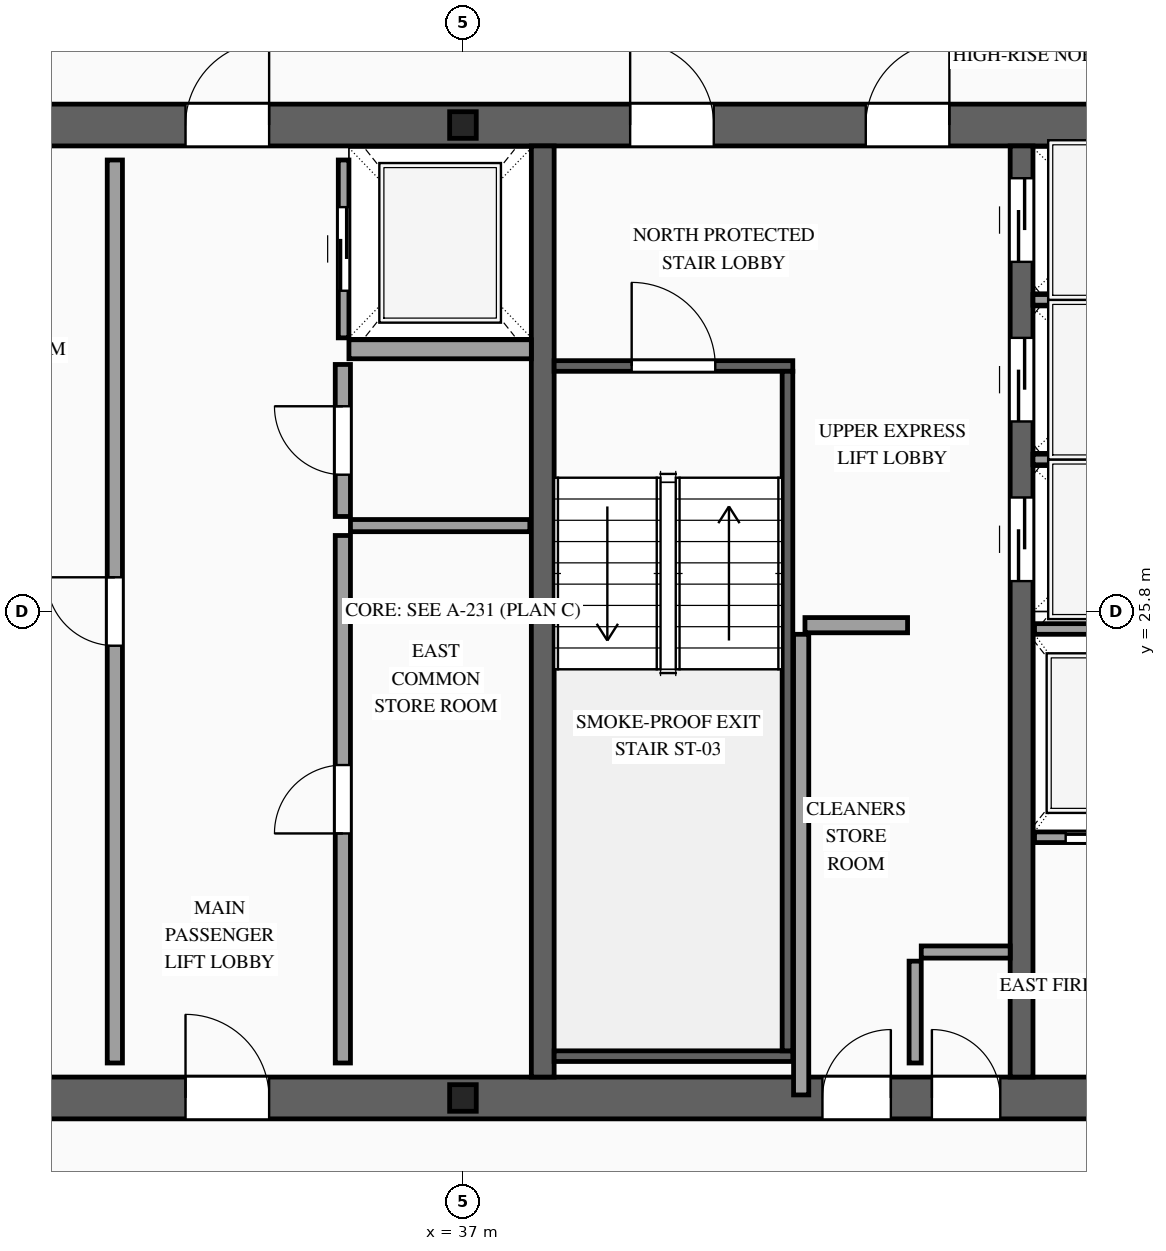
"""IFC4 building model, lengths in metres.
Left out: names, types, materials, properties, quantities, classifications, styles, units other than length and angle.
Written with IfcOpenShell. Run it as: python <this file> out.ifc"""

import sys

from ifc_helpers import new_model, si_unit, direction, frame, frame_2d, origin, origin_2d, place, context, subcontext, project, spatial, rectangle, i_section, extrude, source, transform, mapped, element, fill, save


model = new_model("IFC4")
c1 = context("Model", 3, precision=1e-05, world=origin(), true_north=direction((0.0, 1.0)))
c2 = subcontext(c1, "Body", "Model", "MODEL_VIEW")
j1 = project(units=[si_unit("LENGTHUNIT", "METRE"), si_unit("PLANEANGLEUNIT", "RADIAN")], contexts=[c1])
p1 = place(None, origin())
s1 = spatial("IfcSite", under=j1, at=p1, CompositionType="ELEMENT")
p2 = place(p1, origin())
s2 = spatial("IfcBuilding", under=s1, at=p2, CompositionType="ELEMENT")
p3 = place(p2, frame((0.0, 0.0, 278.6)))
s3 = spatial("IfcBuildingStorey", under=s2, at=p3, CompositionType="ELEMENT", Elevation=278.6)
p4 = place(p3, frame((23.525, 19.4, 0.0), z_axis=(0.0, 0.0, 1.0), x_axis=(1.0, 0.0, 0.0)))
e1 = element("IfcWall", 1, at=p4, inside=s3, PredefinedType="SHEAR", context=c2, shape_type="SweptSolid", body=[
    extrude(rectangle(XDim=26.95, YDim=0.55, at=frame_2d((13.475, 0.0))), origin(), (0.0, 0.0, 1.0), 3.5),
])
p5 = place(p4, frame((1.925, 0.0, 0.0)))
e2 = element("IfcOpeningElement", 2, at=p5, cuts=e1, PredefinedType="OPENING", context=c2, shape_type="SweptSolid", body=[
    extrude(rectangle(XDim=1.1, YDim=2.2, at=frame_2d((0.55, 1.1))), frame((0.0, 0.29, 0.0), z_axis=(0.0, -1.0, 0.0), x_axis=(1.0, 0.0, 0.0)), (0.0, 0.0, 1.0), 0.58),
])
p6 = place(p4, frame((9.825, 0.0, 0.0)))
e3 = element("IfcOpeningElement", 3, at=p6, cuts=e1, PredefinedType="OPENING", context=c2, shape_type="SweptSolid", body=[
    extrude(rectangle(XDim=1.1, YDim=2.2, at=frame_2d((0.55, 1.1))), frame((0.0, 0.29, 0.0), z_axis=(0.0, -1.0, 0.0), x_axis=(1.0, 0.0, 0.0)), (0.0, 0.0, 1.0), 0.58),
])
p7 = place(p4, frame((23.025, 0.0, 0.0)))
e4 = element("IfcOpeningElement", 4, at=p7, cuts=e1, PredefinedType="OPENING", context=c2, shape_type="SweptSolid", body=[
    extrude(rectangle(XDim=1.1, YDim=2.2, at=frame_2d((0.55, 1.1))), frame((0.0, 0.29, 0.0), z_axis=(0.0, -1.0, 0.0), x_axis=(1.0, 0.0, 0.0)), (0.0, 0.0, 1.0), 0.58),
])
p8 = place(p4, frame((19.645, 0.0, 0.0)))
e5 = element("IfcOpeningElement", 5, at=p8, cuts=e1, PredefinedType="OPENING", context=c2, shape_type="SweptSolid", body=[
    extrude(rectangle(XDim=0.9, YDim=2.15, at=frame_2d((0.45, 1.075))), frame((0.0, 0.29, 0.0), z_axis=(0.0, -1.0, 0.0), x_axis=(1.0, 0.0, 0.0)), (0.0, 0.0, 1.0), 0.58),
])
p9 = place(p4, frame((18.205, 0.0, 0.0)))
e6 = element("IfcOpeningElement", 6, at=p9, cuts=e1, PredefinedType="OPENING", context=c2, shape_type="SweptSolid", body=[
    extrude(rectangle(XDim=0.9, YDim=2.15, at=frame_2d((0.45, 1.075))), frame((0.0, 0.29, 0.0), z_axis=(0.0, -1.0, 0.0), x_axis=(1.0, 0.0, 0.0)), (0.0, 0.0, 1.0), 0.58),
])
p10 = place(p3, frame((23.525, 32.2, 0.0), z_axis=(0.0, 0.0, 1.0), x_axis=(1.0, 0.0, 0.0)))
e7 = element("IfcWall", 7, at=p10, inside=s3, PredefinedType="SHEAR", context=c2, shape_type="SweptSolid", body=[
    extrude(rectangle(XDim=26.95, YDim=0.55, at=frame_2d((13.475, 0.0))), origin(), (0.0, 0.0, 1.0), 3.5),
])
p11 = place(p10, frame((4.545, 0.0, 0.0)))
e8 = element("IfcOpeningElement", 8, at=p11, cuts=e7, PredefinedType="OPENING", context=c2, shape_type="SweptSolid", body=[
    extrude(rectangle(XDim=0.9, YDim=2.15, at=frame_2d((0.45, 1.075))), frame((0.0, 0.29, 0.0), z_axis=(0.0, -1.0, 0.0), x_axis=(1.0, 0.0, 0.0)), (0.0, 0.0, 1.0), 0.58),
])
p12 = place(p10, frame((9.825, 0.0, 0.0)))
e9 = element("IfcOpeningElement", 9, at=p12, cuts=e7, PredefinedType="OPENING", context=c2, shape_type="SweptSolid", body=[
    extrude(rectangle(XDim=1.1, YDim=2.2, at=frame_2d((0.55, 1.1))), frame((0.0, 0.29, 0.0), z_axis=(0.0, -1.0, 0.0), x_axis=(1.0, 0.0, 0.0)), (0.0, 0.0, 1.0), 0.58),
])
p13 = place(p10, frame((15.675, 0.0, 0.0)))
e10 = element("IfcOpeningElement", 10, at=p13, cuts=e7, PredefinedType="OPENING", context=c2, shape_type="SweptSolid", body=[
    extrude(rectangle(XDim=1.1, YDim=2.2, at=frame_2d((0.55, 1.1))), frame((0.0, 0.29, 0.0), z_axis=(0.0, -1.0, 0.0), x_axis=(1.0, 0.0, 0.0)), (0.0, 0.0, 1.0), 0.58),
])
p14 = place(p10, frame((18.775, 0.0, 0.0)))
e11 = element("IfcOpeningElement", 11, at=p14, cuts=e7, PredefinedType="OPENING", context=c2, shape_type="SweptSolid", body=[
    extrude(rectangle(XDim=1.1, YDim=2.2, at=frame_2d((0.55, 1.1))), frame((0.0, 0.29, 0.0), z_axis=(0.0, -1.0, 0.0), x_axis=(1.0, 0.0, 0.0)), (0.0, 0.0, 1.0), 0.58),
])
m1 = source(origin(), c2, "Body", "SweptSolid", [
    extrude(rectangle(XDim=12.25, YDim=0.3, at=frame_2d((6.125, 0.0))), origin(), (0.0, 0.0, 1.0), 3.5),
])
p15 = place(p3, frame((38.05, 19.675, 0.0), z_axis=(0.0, 0.0, 1.0), x_axis=(0.0, 1.0, 0.0)))
e12 = element("IfcWall", 12, at=p15, inside=s3, PredefinedType="SOLIDWALL", context=c2, shape_type="MappedRepresentation", body=[
    mapped(m1, transform((0.0, 0.0, 0.0), scale=1.0)),
])
p16 = place(p3, frame((44.35, 19.675, 0.0), z_axis=(0.0, 0.0, 1.0), x_axis=(0.0, 1.0, 0.0)))
e13 = element("IfcWall", 13, at=p16, inside=s3, PredefinedType="SOLIDWALL", context=c2, shape_type="SweptSolid", body=[
    extrude(rectangle(XDim=12.25, YDim=0.3, at=frame_2d((6.125, 0.0))), origin(), (0.0, 0.0, 1.0), 3.5),
])
p17 = place(p16, frame((6.525, 0.0, 0.0)))
e14 = element("IfcOpeningElement", 14, at=p17, cuts=e13, PredefinedType="OPENING", context=c2, shape_type="SweptSolid", body=[
    extrude(rectangle(XDim=1.1, YDim=2.2, at=frame_2d((0.55, 1.1))), frame((0.0, 0.165, 0.0), z_axis=(0.0, -1.0, 0.0), x_axis=(1.0, 0.0, 0.0)), (0.0, 0.0, 1.0), 0.33),
])
p18 = place(p16, frame((8.625, 0.0, 0.0)))
e15 = element("IfcOpeningElement", 15, at=p18, cuts=e13, PredefinedType="OPENING", context=c2, shape_type="SweptSolid", body=[
    extrude(rectangle(XDim=1.1, YDim=2.2, at=frame_2d((0.55, 1.1))), frame((0.0, 0.165, 0.0), z_axis=(0.0, -1.0, 0.0), x_axis=(1.0, 0.0, 0.0)), (0.0, 0.0, 1.0), 0.33),
])
p19 = place(p16, frame((10.725, 0.0, 0.0)))
e16 = element("IfcOpeningElement", 16, at=p19, cuts=e13, PredefinedType="OPENING", context=c2, shape_type="SweptSolid", body=[
    extrude(rectangle(XDim=1.1, YDim=2.2, at=frame_2d((0.55, 1.1))), frame((0.0, 0.165, 0.0), z_axis=(0.0, -1.0, 0.0), x_axis=(1.0, 0.0, 0.0)), (0.0, 0.0, 1.0), 0.33),
])
m2 = source(origin(), c2, "Body", "SweptSolid", [
    extrude(i_section(OverallWidth=0.35, OverallDepth=0.35, WebThickness=0.012, FlangeThickness=0.019, at=origin_2d()), origin(), (0.0, 0.0, 1.0), 3.5),
])
for number, where, z_axis, x_axis in (
    (17, (37.0, 19.4, 0.0), (0.0, 0.0, 1.0), (1.0, 0.0, 0.0)),
    (18, (37.0, 32.2, 0.0), (0.0, 0.0, 1.0), (1.0, 0.0, 0.0)),
):
    element("IfcColumn", number, at=place(p3, frame(where, z_axis=z_axis, x_axis=x_axis)), inside=s3, PredefinedType="COLUMN", context=c2, shape_type="MappedRepresentation", body=[
        mapped(m2, transform((0.0, 0.0, 0.0), scale=1.0)),
    ])
p20 = place(p3, frame((44.52, 22.83, 0.0), z_axis=(0.0, 0.0, 1.0), x_axis=(1.0, 0.0, 0.0)))
e19 = element("IfcWall", 19, at=p20, inside=s3, PredefinedType="SOLIDWALL", context=c2, shape_type="SweptSolid", body=[
    extrude(rectangle(XDim=1.92, YDim=0.14, at=frame_2d((0.96, 0.0))), origin(), (0.0, 0.0, 1.0), 3.28),
])
p21 = place(p20, frame((0.41, 0.0, 0.0)))
e20 = element("IfcOpeningElement", 20, at=p21, cuts=e19, PredefinedType="OPENING", context=c2, shape_type="SweptSolid", body=[
    extrude(rectangle(XDim=1.1, YDim=2.2, at=frame_2d((0.55, 1.1))), frame((0.0, 0.085, 0.0), z_axis=(0.0, -1.0, 0.0), x_axis=(1.0, 0.0, 0.0)), (0.0, 0.0, 1.0), 0.17),
])
m3 = source(origin(), c2, "Body", "SweptSolid", [
    extrude(rectangle(XDim=1.92, YDim=0.14, at=frame_2d((0.96, 0.0))), origin(), (0.0, 0.0, 1.0), 3.28),
])
p22 = place(p3, frame((44.52, 25.57, 0.0), z_axis=(0.0, 0.0, 1.0), x_axis=(1.0, 0.0, 0.0)))
e21 = element("IfcWall", 21, at=p22, inside=s3, PredefinedType="SOLIDWALL", context=c2, shape_type="MappedRepresentation", body=[
    mapped(m3, transform((0.0, 0.0, 0.0), scale=1.0)),
])
p23 = place(p3, frame((35.43, 29.4, 0.0), z_axis=(0.0, 0.0, 1.0), x_axis=(0.0, 1.0, 0.0)))
e22 = element("IfcWall", 22, at=p23, inside=s3, PredefinedType="SOLIDWALL", context=c2, shape_type="SweptSolid", body=[
    extrude(rectangle(XDim=2.34, YDim=0.14, at=frame_2d((1.17, 0.0))), origin(), (0.0, 0.0, 1.0), 3.28),
])
p24 = place(p23, frame((0.62, 0.0, 0.0)))
e23 = element("IfcOpeningElement", 23, at=p24, cuts=e22, PredefinedType="OPENING", context=c2, shape_type="SweptSolid", body=[
    extrude(rectangle(XDim=1.1, YDim=2.2, at=frame_2d((0.55, 1.1))), frame((0.0, 0.085, 0.0), z_axis=(0.0, -1.0, 0.0), x_axis=(1.0, 0.0, 0.0)), (0.0, 0.0, 1.0), 0.17),
])
m4 = source(origin(), c2, "Body", "SweptSolid", [
    extrude(rectangle(XDim=2.4, YDim=0.25, at=frame_2d((1.2, 0.0))), origin(), (0.0, 0.0, 1.0), 3.28),
])
p25 = place(p3, frame((35.5, 29.25, 0.0), z_axis=(0.0, 0.0, 1.0), x_axis=(1.0, 0.0, 0.0)))
e24 = element("IfcWall", 24, at=p25, inside=s3, PredefinedType="SOLIDWALL", context=c2, shape_type="MappedRepresentation", body=[
    mapped(m4, transform((0.0, 0.0, 0.0), scale=1.0)),
])
m5 = source(origin(), c2, "Body", "SweptSolid", [
    extrude(rectangle(XDim=2.0, YDim=0.14, at=frame_2d((1.0, 0.0))), origin(), (0.0, 0.0, 1.0), 3.28),
])
for number, where, z_axis, x_axis in (
    (25, (44.5, 27.8, 0.0), (0.0, 0.0, 1.0), (1.0, 0.0, 0.0)),
    (26, (44.5, 29.9, 0.0), (0.0, 0.0, 1.0), (1.0, 0.0, 0.0)),
):
    element("IfcWall", number, at=place(p3, frame(where, z_axis=z_axis, x_axis=x_axis)), inside=s3, PredefinedType="SOLIDWALL", context=c2, shape_type="MappedRepresentation", body=[
        mapped(m5, transform((0.0, 0.0, 0.0), scale=1.0)),
    ])
p26 = place(p3, frame((38.2, 29.03, 0.0), z_axis=(0.0, 0.0, 1.0), x_axis=(1.0, 0.0, 0.0)))
e27 = element("IfcWall", 27, at=p26, inside=s3, PredefinedType="SOLIDWALL", context=c2, shape_type="SweptSolid", body=[
    extrude(rectangle(XDim=3.14, YDim=0.14, at=frame_2d((1.57, 0.0))), origin(), (0.0, 0.0, 1.0), 3.28),
])
p27 = place(p26, frame((1.02, 0.0, 0.0)))
e28 = element("IfcOpeningElement", 28, at=p27, cuts=e27, PredefinedType="OPENING", context=c2, shape_type="SweptSolid", body=[
    extrude(rectangle(XDim=1.1, YDim=2.2, at=frame_2d((0.55, 1.1))), frame((0.0, 0.085, 0.0), z_axis=(0.0, -1.0, 0.0), x_axis=(1.0, 0.0, 0.0)), (0.0, 0.0, 1.0), 0.17),
])
m6 = source(origin(), c2, "Body", "SweptSolid", [
    extrude(rectangle(XDim=3.14, YDim=0.14, at=frame_2d((1.57, 0.0))), origin(), (0.0, 0.0, 1.0), 3.28),
])
p28 = place(p3, frame((38.2, 19.95, 0.0), z_axis=(0.0, 0.0, 1.0), x_axis=(1.0, 0.0, 0.0)))
e29 = element("IfcWall", 29, at=p28, inside=s3, PredefinedType="SOLIDWALL", context=c2, shape_type="MappedRepresentation", body=[
    mapped(m6, transform((0.0, 0.0, 0.0), scale=1.0)),
])
m7 = source(origin(), c2, "Body", "SweptSolid", [
    extrude(rectangle(XDim=8.94, YDim=0.14, at=frame_2d((4.47, 0.0))), origin(), (0.0, 0.0, 1.0), 3.28),
])
p29 = place(p3, frame((41.27, 20.02, 0.0), z_axis=(0.0, 0.0, 1.0), x_axis=(0.0, 1.0, 0.0)))
e30 = element("IfcWall", 30, at=p29, inside=s3, PredefinedType="SOLIDWALL", context=c2, shape_type="MappedRepresentation", body=[
    mapped(m7, transform((0.0, 0.0, 0.0), scale=1.0)),
])
p30 = place(p3, frame((32.42, 19.86, 0.0), z_axis=(0.0, 0.0, 1.0), x_axis=(0.0, 1.0, 0.0)))
e31 = element("IfcWall", 31, at=p30, inside=s3, PredefinedType="PARTITIONING", context=c2, shape_type="SweptSolid", body=[
    extrude(rectangle(XDim=11.88, YDim=0.2, at=frame_2d((5.94, 0.0))), origin(), (0.0, 0.0, 1.0), 3.28),
])
p31 = place(p30, frame((5.49, 0.0, 0.0)))
e32 = element("IfcOpeningElement", 32, at=p31, cuts=e31, PredefinedType="OPENING", context=c2, shape_type="SweptSolid", body=[
    extrude(rectangle(XDim=0.9, YDim=2.15, at=frame_2d((0.45, 1.075))), frame((0.0, 0.115, 0.0), z_axis=(0.0, -1.0, 0.0), x_axis=(1.0, 0.0, 0.0)), (0.0, 0.0, 1.0), 0.23),
])
p32 = place(p3, frame((35.42, 19.86, 0.0), z_axis=(0.0, 0.0, 1.0), x_axis=(0.0, 1.0, 0.0)))
e33 = element("IfcWall", 33, at=p32, inside=s3, PredefinedType="PARTITIONING", context=c2, shape_type="SweptSolid", body=[
    extrude(rectangle(XDim=6.94, YDim=0.2, at=frame_2d((3.47, 0.0))), origin(), (0.0, 0.0, 1.0), 3.28),
])
p33 = place(p32, frame((3.02, 0.0, 0.0)))
e34 = element("IfcOpeningElement", 34, at=p33, cuts=e33, PredefinedType="OPENING", context=c2, shape_type="SweptSolid", body=[
    extrude(rectangle(XDim=0.9, YDim=2.15, at=frame_2d((0.45, 1.075))), frame((0.0, 0.115, 0.0), z_axis=(0.0, -1.0, 0.0), x_axis=(1.0, 0.0, 0.0)), (0.0, 0.0, 1.0), 0.23),
])
p34 = place(p3, frame((35.42, 27.05, 0.0), z_axis=(0.0, 0.0, 1.0), x_axis=(0.0, 1.0, 0.0)))
e35 = element("IfcWall", 35, at=p34, inside=s3, PredefinedType="PARTITIONING", context=c2, shape_type="SweptSolid", body=[
    extrude(rectangle(XDim=2.0, YDim=0.2, at=frame_2d((1.0, 0.0))), origin(), (0.0, 0.0, 1.0), 3.28),
])
p35 = place(p34, frame((0.55, 0.0, 0.0)))
e36 = element("IfcOpeningElement", 36, at=p35, cuts=e35, PredefinedType="OPENING", context=c2, shape_type="SweptSolid", body=[
    extrude(rectangle(XDim=0.9, YDim=2.15, at=frame_2d((0.45, 1.075))), frame((0.0, 0.115, 0.0), z_axis=(0.0, -1.0, 0.0), x_axis=(1.0, 0.0, 0.0)), (0.0, 0.0, 1.0), 0.23),
])
m8 = source(origin(), c2, "Body", "SweptSolid", [
    extrude(rectangle(XDim=2.36, YDim=0.16, at=frame_2d((1.18, 0.0))), origin(), (0.0, 0.0, 1.0), 3.28),
])
p36 = place(p3, frame((35.52, 26.93, 0.0), z_axis=(0.0, 0.0, 1.0), x_axis=(1.0, 0.0, 0.0)))
e37 = element("IfcWall", 37, at=p36, inside=s3, PredefinedType="PARTITIONING", context=c2, shape_type="MappedRepresentation", body=[
    mapped(m8, transform((0.0, 0.0, 0.0), scale=1.0)),
])
m9 = source(origin(), c2, "Body", "SweptSolid", [
    extrude(rectangle(XDim=1.34, YDim=0.16, at=frame_2d((0.67, 0.0))), origin(), (0.0, 0.0, 1.0), 3.28),
])
p37 = place(p3, frame((42.95, 19.86, 0.0), z_axis=(0.0, 0.0, 1.0), x_axis=(0.0, 1.0, 0.0)))
e38 = element("IfcWall", 38, at=p37, inside=s3, PredefinedType="PARTITIONING", context=c2, shape_type="MappedRepresentation", body=[
    mapped(m9, transform((0.0, 0.0, 0.0), scale=1.0)),
])
m10 = source(origin(), c2, "Body", "SweptSolid", [
    extrude(rectangle(XDim=1.17, YDim=0.16, at=frame_2d((0.585, 0.0))), origin(), (0.0, 0.0, 1.0), 3.28),
])
p38 = place(p3, frame((43.03, 21.32, 0.0), z_axis=(0.0, 0.0, 1.0), x_axis=(1.0, 0.0, 0.0)))
e39 = element("IfcWall", 39, at=p38, inside=s3, PredefinedType="PARTITIONING", context=c2, shape_type="MappedRepresentation", body=[
    mapped(m10, transform((0.0, 0.0, 0.0), scale=1.0)),
])
m11 = source(origin(), c2, "Body", "SweptSolid", [
    extrude(rectangle(XDim=6.06, YDim=0.2, at=frame_2d((3.03, 0.0))), origin(), (0.0, 0.0, 1.0), 3.28),
])
p39 = place(p3, frame((41.45, 19.44, 0.0), z_axis=(0.0, 0.0, 1.0), x_axis=(0.0, 1.0, 0.0)))
e40 = element("IfcWall", 40, at=p39, inside=s3, PredefinedType="PARTITIONING", context=c2, shape_type="MappedRepresentation", body=[
    mapped(m11, transform((0.0, 0.0, 0.0), scale=1.0)),
])
m12 = source(origin(), c2, "Body", "SweptSolid", [
    extrude(rectangle(XDim=1.35, YDim=0.2, at=frame_2d((0.675, 0.0))), origin(), (0.0, 0.0, 1.0), 3.28),
])
p40 = place(p3, frame((41.5, 25.62, 0.0), z_axis=(0.0, 0.0, 1.0), x_axis=(1.0, 0.0, 0.0)))
e41 = element("IfcWall", 41, at=p40, inside=s3, PredefinedType="PARTITIONING", context=c2, shape_type="MappedRepresentation", body=[
    mapped(m12, transform((0.0, 0.0, 0.0), scale=1.0)),
])
m13 = source(origin(), c2, "Body", "SweptSolid", [
    extrude(rectangle(XDim=1.1, YDim=2.2, at=frame_2d((0.55, 1.1))), frame((0.0, 0.025, 0.0), z_axis=(0.0, -1.0, 0.0), x_axis=(1.0, 0.0, 0.0)), (0.0, 0.0, 1.0), 0.05),
])
p41 = place(p21, origin())
e42 = element("IfcDoor", 42, at=p41, inside=s3, OperationType="SLIDING_TO_RIGHT", PredefinedType="DOOR", context=c2, shape_type="MappedRepresentation", body=[
    mapped(m13, transform((0.0, 0.0, 0.0), scale=1.0)),
])
fill(e20, e42)
p42 = place(p24, origin())
e43 = element("IfcDoor", 43, at=p42, inside=s3, OperationType="SLIDING_TO_RIGHT", PredefinedType="DOOR", context=c2, shape_type="MappedRepresentation", body=[
    mapped(m13, transform((0.0, 0.0, 0.0), scale=1.0)),
])
fill(e23, e43)
p43 = place(p17, origin())
e44 = element("IfcDoor", 44, at=p43, inside=s3, OperationType="SLIDING_TO_LEFT", PredefinedType="DOOR", context=c2, shape_type="MappedRepresentation", body=[
    mapped(m13, transform((0.0, 0.0, 0.0), scale=1.0)),
])
fill(e14, e44)
p44 = place(p18, origin())
e45 = element("IfcDoor", 45, at=p44, inside=s3, OperationType="SLIDING_TO_RIGHT", PredefinedType="DOOR", context=c2, shape_type="MappedRepresentation", body=[
    mapped(m13, transform((0.0, 0.0, 0.0), scale=1.0)),
])
fill(e15, e45)
p45 = place(p19, origin())
e46 = element("IfcDoor", 46, at=p45, inside=s3, OperationType="SLIDING_TO_LEFT", PredefinedType="DOOR", context=c2, shape_type="MappedRepresentation", body=[
    mapped(m13, transform((0.0, 0.0, 0.0), scale=1.0)),
])
fill(e16, e46)
m14 = source(origin(), c2, "Body", "SweptSolid", [
    extrude(rectangle(XDim=1.1, YDim=2.2, at=frame_2d((0.55, 1.1))), frame((0.0, 0.025, 0.0), z_axis=(0.0, -1.0, 0.0), x_axis=(1.0, 0.0, 0.0)), (0.0, 0.0, 1.0), 0.05),
])
p46 = place(p27, origin())
e47 = element("IfcDoor", 47, at=p46, inside=s3, OperationType="SINGLE_SWING_LEFT", PredefinedType="DOOR", context=c2, shape_type="MappedRepresentation", body=[
    mapped(m14, transform((0.0, 0.0, 0.0), scale=1.0)),
])
fill(e28, e47)
p47 = place(p6, origin())
e48 = element("IfcDoor", 48, at=p47, inside=s3, OperationType="SINGLE_SWING_LEFT", PredefinedType="DOOR", context=c2, shape_type="MappedRepresentation", body=[
    mapped(m14, transform((0.0, 0.0, 0.0), scale=1.0)),
])
fill(e3, e48)
p48 = place(p12, origin())
e49 = element("IfcDoor", 49, at=p48, inside=s3, OperationType="SINGLE_SWING_RIGHT", PredefinedType="DOOR", context=c2, shape_type="MappedRepresentation", body=[
    mapped(m14, transform((0.0, 0.0, 0.0), scale=1.0)),
])
fill(e9, e49)
p49 = place(p13, origin())
e50 = element("IfcDoor", 50, at=p49, inside=s3, OperationType="SINGLE_SWING_LEFT", PredefinedType="DOOR", context=c2, shape_type="MappedRepresentation", body=[
    mapped(m14, transform((0.0, 0.0, 0.0), scale=1.0)),
])
fill(e10, e50)
p50 = place(p14, origin())
e51 = element("IfcDoor", 51, at=p50, inside=s3, OperationType="SINGLE_SWING_RIGHT", PredefinedType="DOOR", context=c2, shape_type="MappedRepresentation", body=[
    mapped(m14, transform((0.0, 0.0, 0.0), scale=1.0)),
])
fill(e11, e51)
m15 = source(origin(), c2, "Body", "SweptSolid", [
    extrude(rectangle(XDim=0.9, YDim=2.15, at=frame_2d((0.45, 1.075))), frame((0.0, 0.025, 0.0), z_axis=(0.0, -1.0, 0.0), x_axis=(1.0, 0.0, 0.0)), (0.0, 0.0, 1.0), 0.05),
])
p51 = place(p31, origin())
e52 = element("IfcDoor", 52, at=p51, inside=s3, OperationType="SINGLE_SWING_RIGHT", PredefinedType="DOOR", context=c2, shape_type="MappedRepresentation", body=[
    mapped(m15, transform((0.0, 0.0, 0.0), scale=1.0)),
])
fill(e32, e52)
p52 = place(p33, origin())
e53 = element("IfcDoor", 53, at=p52, inside=s3, OperationType="SINGLE_SWING_LEFT", PredefinedType="DOOR", context=c2, shape_type="MappedRepresentation", body=[
    mapped(m15, transform((0.0, 0.0, 0.0), scale=1.0)),
])
fill(e34, e53)
p53 = place(p35, origin())
e54 = element("IfcDoor", 54, at=p53, inside=s3, OperationType="SINGLE_SWING_RIGHT", PredefinedType="DOOR", context=c2, shape_type="MappedRepresentation", body=[
    mapped(m15, transform((0.0, 0.0, 0.0), scale=1.0)),
])
fill(e36, e54)
p54 = place(p8, origin())
e55 = element("IfcDoor", 55, at=p54, inside=s3, OperationType="SINGLE_SWING_LEFT", PredefinedType="DOOR", context=c2, shape_type="MappedRepresentation", body=[
    mapped(m15, transform((0.0, 0.0, 0.0), scale=1.0)),
])
fill(e5, e55)
p55 = place(p9, origin())
e56 = element("IfcDoor", 56, at=p55, inside=s3, OperationType="SINGLE_SWING_RIGHT", PredefinedType="DOOR", context=c2, shape_type="MappedRepresentation", body=[
    mapped(m15, transform((0.0, 0.0, 0.0), scale=1.0)),
])
fill(e6, e56)
save(model, sys.argv[1])
